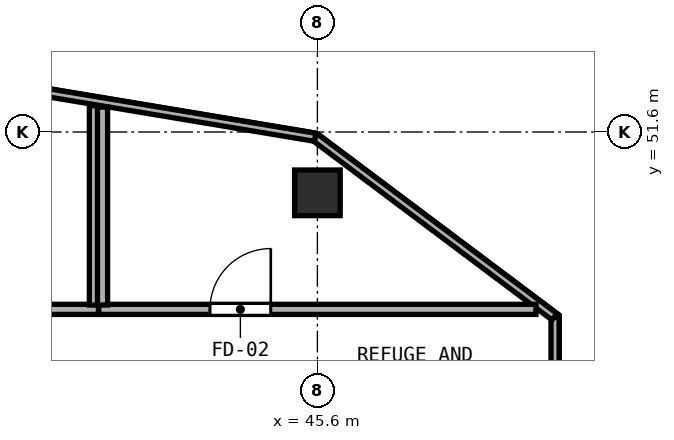
"""IFC4 building model, lengths in metres.
Left out: names, types, materials, properties, quantities, classifications, styles, units other than length and angle.
Written with IfcOpenShell. Run it as: python <this file> out.ifc"""

import sys

from ifc_helpers import new_model, si_unit, direction, frame, frame_2d, origin, origin_2d, place, context, subcontext, project, spatial, rectangle, hollow_rectangle, extrude, element, fill, save


model = new_model("IFC4")
c1 = context("Model", 3, precision=1e-05, world=origin(), true_north=direction((0.0, 1.0)))
c2 = subcontext(c1, "Body", "Model", "MODEL_VIEW")
j1 = project(units=[si_unit("LENGTHUNIT", "METRE"), si_unit("PLANEANGLEUNIT", "RADIAN")], contexts=[c1])
p1 = place(None, origin())
s1 = spatial("IfcSite", under=j1, at=p1, CompositionType="ELEMENT")
p2 = place(p1, origin())
s2 = spatial("IfcBuilding", under=s1, at=p2, CompositionType="ELEMENT")
p3 = place(p2, frame((0.0, 0.0, 230.6)))
s3 = spatial("IfcBuildingStorey", under=s2, at=p3, CompositionType="ELEMENT", Elevation=230.6)
p4 = place(p3, frame((45.6, 50.4, 0.0), z_axis=(0.0, 0.0, 1.0), x_axis=(1.0, 0.0, 0.0)))
e1 = element("IfcColumn", 1, at=p4, inside=s3, PredefinedType="COLUMN", context=c2, shape_type="SweptSolid", body=[
    extrude(hollow_rectangle(XDim=0.9, YDim=0.9, WallThickness=0.034, at=origin_2d()), origin(), (0.0, 0.0, 1.0), 4.6),
])
p5 = place(p3, frame((50.29, 46.72, 0.0), z_axis=(0.0, 0.0, 1.0), x_axis=(0.0, 1.0, 0.0)))
e2 = element("IfcWall", 2, at=p5, inside=s3, PredefinedType="PARAPET", context=c2, shape_type="SweptSolid", body=[
    extrude(rectangle(XDim=1.225, YDim=0.16, at=frame_2d((0.613, 0.0))), origin(), (0.0, 0.0, 1.0), 1.15),
])
p6 = place(p3, frame((50.278, 47.954, 0.0), z_axis=(0.0, 0.0, 1.0), x_axis=(-0.800019851171, 0.599973530859, 0.0)))
e3 = element("IfcWall", 3, at=p6, inside=s3, PredefinedType="PARAPET", context=c2, shape_type="SweptSolid", body=[
    extrude(rectangle(XDim=5.903, YDim=0.16, at=frame_2d((2.952, 0.0))), origin(), (0.0, 0.0, 1.0), 1.15),
])
p7 = place(p3, frame((45.555, 51.496, 0.0), z_axis=(0.0, 0.0, 1.0), x_axis=(-0.986393014224, 0.164404444863, 0.0)))
e4 = element("IfcWall", 4, at=p7, inside=s3, PredefinedType="PARAPET", context=c2, shape_type="SweptSolid", body=[
    extrude(rectangle(XDim=7.254, YDim=0.16, at=frame_2d((3.627, 0.0))), origin(), (0.0, 0.0, 1.0), 1.15),
])
p8 = place(p3, frame((26.887, 48.1, 0.0), z_axis=(0.0, 0.0, 1.0), x_axis=(1.0, 0.0, 0.0)))
e5 = element("IfcWall", 5, at=p8, inside=s3, PredefinedType="SOLIDWALL", context=c2, shape_type="SweptSolid", body=[
    extrude(rectangle(XDim=14.393, YDim=0.2, at=frame_2d((7.197, 0.0))), origin(), (0.0, 0.0, 1.0), 4.35),
])
p9 = place(p8, frame((4.063, 0.0, 0.0)))
e6 = element("IfcOpeningElement", 6, at=p9, cuts=e5, PredefinedType="OPENING", context=c2, shape_type="SweptSolid", body=[
    extrude(rectangle(XDim=1.2, YDim=2.15, at=frame_2d((0.6, 1.075))), frame((0.0, 0.11, 0.0), z_axis=(0.0, -1.0, 0.0), x_axis=(1.0, 0.0, 0.0)), (0.0, 0.0, 1.0), 0.22),
])
p10 = place(p3, frame((41.2, 48.185, 0.0), z_axis=(0.0, 0.0, 1.0), x_axis=(0.0, 1.0, 0.0)))
e7 = element("IfcWall", 7, at=p10, inside=s3, PredefinedType="SOLIDWALL", context=c2, shape_type="SweptSolid", body=[
    extrude(rectangle(XDim=3.933, YDim=0.2, at=frame_2d((1.967, 0.0))), origin(), (0.0, 0.0, 1.0), 4.35),
])
p11 = place(p3, frame((41.285, 48.1, 0.0), z_axis=(0.0, 0.0, 1.0), x_axis=(1.0, 0.0, 0.0)))
e8 = element("IfcWall", 8, at=p11, inside=s3, PredefinedType="SOLIDWALL", context=c2, shape_type="SweptSolid", body=[
    extrude(rectangle(XDim=8.628, YDim=0.2, at=frame_2d((4.314, 0.0))), origin(), (0.0, 0.0, 1.0), 4.35),
])
p12 = place(p11, frame((2.195, 0.0, 0.0)))
e9 = element("IfcOpeningElement", 9, at=p12, cuts=e8, PredefinedType="OPENING", context=c2, shape_type="SweptSolid", body=[
    extrude(rectangle(XDim=1.2, YDim=2.15, at=frame_2d((0.6, 1.075))), frame((0.0, 0.11, 0.0), z_axis=(0.0, -1.0, 0.0), x_axis=(1.0, 0.0, 0.0)), (0.0, 0.0, 1.0), 0.22),
])
p13 = place(p3, frame((41.36, 48.185, 0.0), z_axis=(0.0, 0.0, 1.0), x_axis=(0.0, 1.0, 0.0)))
e10 = element("IfcWall", 10, at=p13, inside=s3, PredefinedType="SOLIDWALL", context=c2, shape_type="SweptSolid", body=[
    extrude(rectangle(XDim=3.907, YDim=0.2, at=frame_2d((1.953, 0.0))), origin(), (0.0, 0.0, 1.0), 4.35),
])
p14 = place(p12, origin())
e11 = element("IfcDoor", 11, at=p14, inside=s3, OperationType="SINGLE_SWING_RIGHT", PredefinedType="DOOR", context=c2, shape_type="SweptSolid", body=[
    extrude(rectangle(XDim=1.2, YDim=2.15, at=frame_2d((0.6, 1.075))), frame((0.0, 0.025, 0.0), z_axis=(0.0, -1.0, 0.0), x_axis=(1.0, 0.0, 0.0)), (0.0, 0.0, 1.0), 0.05),
])
fill(e9, e11)
save(model, sys.argv[1])
